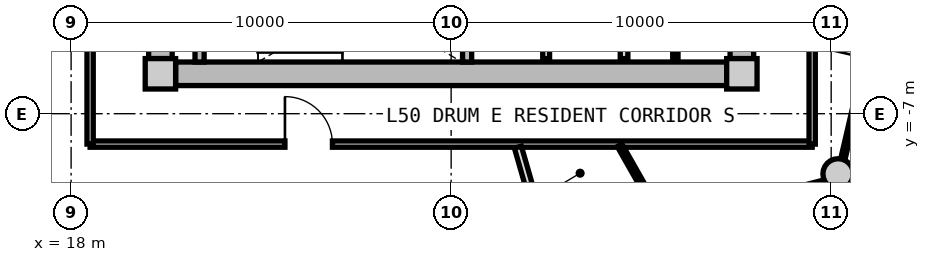
"""IFC4 building model, lengths in metres.
Left out: names, types, materials, properties, quantities, classifications, styles, units other than length and angle.
Written with IfcOpenShell. Run it as: python <this file> out.ifc"""

import sys

from ifc_helpers import new_model, si_unit, direction, frame, frame_2d, origin, origin_2d, place, context, subcontext, project, spatial, rectangle, circle, extrude, source, transform, mapped, element, fill, save


model = new_model("IFC4")
c1 = context("Model", 3, precision=1e-05, world=origin(), true_north=direction((0.0, 1.0)))
c2 = subcontext(c1, "Body", "Model", "MODEL_VIEW")
j1 = project(units=[si_unit("LENGTHUNIT", "METRE"), si_unit("PLANEANGLEUNIT", "RADIAN")], contexts=[c1])
p1 = place(None, origin())
s1 = spatial("IfcSite", under=j1, at=p1, CompositionType="ELEMENT")
p2 = place(p1, origin())
s2 = spatial("IfcBuilding", under=s1, at=p2, CompositionType="ELEMENT")
p3 = place(p2, frame((0.0, 0.0, 161.75)))
s3 = spatial("IfcBuildingStorey", under=s2, at=p3, CompositionType="ELEMENT", Elevation=161.75)
m1 = source(origin(), c2, "Body", "SweptSolid", [
    extrude(rectangle(XDim=0.8, YDim=0.8, at=origin_2d()), origin(), (0.0, 0.0, 1.0), 3.05),
])
for number, where, z_axis, x_axis in (
    (1, (20.35, -5.95, 0.0), (0.0, 0.0, 1.0), (1.0, 0.0, 0.0)),
    (2, (35.65, -5.95, 0.0), (0.0, 0.0, 1.0), (1.0, 0.0, 0.0)),
):
    element("IfcColumn", number, at=place(p3, frame(where, z_axis=z_axis, x_axis=x_axis)), inside=s3, PredefinedType="COLUMN", context=c2, shape_type="MappedRepresentation", body=[
        mapped(m1, transform((0.0, 0.0, 0.0), x_axis=(1.0, 0.0, 0.0), y_axis=(0.0, 1.0, 0.0), z_axis=(0.0, 0.0, 1.0), scale=1.0)),
    ])
m2 = source(origin(), c2, "Body", "SweptSolid", [
    extrude(rectangle(XDim=14.5, YDim=0.62, at=frame_2d((7.25, 0.0))), origin(), (0.0, 0.0, 1.0), 2.81),
])
p4 = place(p3, frame((35.25, -5.95, 0.0), z_axis=(0.0, 0.0, 1.0), x_axis=(-1.0, 0.0, 0.0)))
e3 = element("IfcWall", 3, at=p4, inside=s3, PredefinedType="SHEAR", context=c2, shape_type="MappedRepresentation", body=[
    mapped(m2, transform((0.0, 0.0, 0.0), x_axis=(1.0, 0.0, 0.0), y_axis=(0.0, 1.0, 0.0), z_axis=(0.0, 0.0, 1.0), scale=1.0)),
])
m3 = source(origin(), c2, "Body", "SweptSolid", [
    extrude(rectangle(XDim=11.1, YDim=0.62, at=frame_2d((5.55, 0.0))), origin(), (0.0, 0.0, 1.0), 2.81),
])
p5 = place(p3, frame((20.35, -5.55, 0.0), z_axis=(0.0, 0.0, 1.0), x_axis=(0.0, 1.0, 0.0)))
e4 = element("IfcWall", 4, at=p5, inside=s3, PredefinedType="SHEAR", context=c2, shape_type="MappedRepresentation", body=[
    mapped(m3, transform((0.0, 0.0, 0.0), x_axis=(1.0, 0.0, 0.0), y_axis=(0.0, 1.0, 0.0), z_axis=(0.0, 0.0, 1.0), scale=1.0)),
])
p6 = place(p5, frame((3.8, 0.0, 0.0)))
e5 = element("IfcOpeningElement", 5, at=p6, cuts=e4, PredefinedType="OPENING", context=c2, shape_type="SweptSolid", body=[
    extrude(rectangle(XDim=1.2, YDim=2.15, at=frame_2d((0.6, 1.075))), frame((0.0, 0.32, 0.0), z_axis=(0.0, -1.0, 0.0), x_axis=(1.0, 0.0, 0.0)), (0.0, 0.0, 1.0), 0.64),
])
p7 = place(p3, frame((35.65, 5.55, 0.0), z_axis=(0.0, 0.0, 1.0), x_axis=(0.0, -1.0, 0.0)))
e6 = element("IfcWall", 6, at=p7, inside=s3, PredefinedType="SHEAR", context=c2, shape_type="MappedRepresentation", body=[
    mapped(m3, transform((0.0, 0.0, 0.0), x_axis=(1.0, 0.0, 0.0), y_axis=(0.0, 1.0, 0.0), z_axis=(0.0, 0.0, 1.0), scale=1.0)),
])
p8 = place(p7, frame((5.65, 0.0, 0.0)))
e7 = element("IfcOpeningElement", 7, at=p8, cuts=e6, PredefinedType="OPENING", context=c2, shape_type="SweptSolid", body=[
    extrude(rectangle(XDim=1.2, YDim=2.15, at=frame_2d((0.6, 1.075))), frame((0.0, 0.32, 0.0), z_axis=(0.0, -1.0, 0.0), x_axis=(1.0, 0.0, 0.0)), (0.0, 0.0, 1.0), 0.64),
])
m4 = source(origin(), c2, "Body", "SweptSolid", [
    extrude(circle(Radius=0.4, at=origin_2d()), origin(), (0.0, 0.0, 1.0), 3.05),
])
p9 = place(p3, frame((38.183, -8.584, 0.0), z_axis=(0.0, 0.0, 1.0), x_axis=(1.0, 0.0, 0.0)))
e8 = element("IfcColumn", 8, at=p9, inside=s3, PredefinedType="COLUMN", context=c2, shape_type="MappedRepresentation", body=[
    mapped(m4, transform((0.0, 0.0, 0.0), x_axis=(1.0, 0.0, 0.0), y_axis=(0.0, 1.0, 0.0), z_axis=(0.0, 0.0, 1.0), scale=1.0)),
])
m5 = source(origin(), c2, "Body", "SweptSolid", [
    extrude(rectangle(XDim=3.19, YDim=0.24, at=frame_2d((1.595, 0.0))), origin(), (0.0, 0.0, 1.0), 2.81),
])
for number, where, z_axis, x_axis in (
    (9, (21.38, -5.64, 0.0), (0.0, 0.0, 1.0), (0.0, 1.0, 0.0)),
    (10, (28.42, -5.64, 0.0), (0.0, 0.0, 1.0), (0.0, 1.0, 0.0)),
):
    element("IfcWall", number, at=place(p3, frame(where, z_axis=z_axis, x_axis=x_axis)), inside=s3, PredefinedType="PARTITIONING", context=c2, shape_type="MappedRepresentation", body=[
        mapped(m5, transform((0.0, 0.0, 0.0), x_axis=(1.0, 0.0, 0.0), y_axis=(0.0, 1.0, 0.0), z_axis=(0.0, 0.0, 1.0), scale=1.0)),
    ])
m6 = source(origin(), c2, "Body", "SweptSolid", [
    extrude(rectangle(XDim=3.8, YDim=0.2, at=frame_2d((1.9, 0.0))), origin(), (0.0, 0.0, 1.0), 2.795),
])
p10 = place(p3, frame((32.55, -5.55, 0.0), z_axis=(0.0, 0.0, 1.0), x_axis=(0.0, 1.0, 0.0)))
e11 = element("IfcWall", 11, at=p10, inside=s3, PredefinedType="PARTITIONING", context=c2, shape_type="MappedRepresentation", body=[
    mapped(m6, transform((0.0, 0.0, 0.0), x_axis=(1.0, 0.0, 0.0), y_axis=(0.0, 1.0, 0.0), z_axis=(0.0, 0.0, 1.0), scale=1.0)),
])
m7 = source(origin(), c2, "Body", "SweptSolid", [
    extrude(rectangle(XDim=4.2, YDim=0.18, at=frame_2d((2.1, 0.0))), origin(), (0.0, 0.0, 1.0), 2.795),
])
p11 = place(p3, frame((30.5, -5.55, 0.0), z_axis=(0.0, 0.0, 1.0), x_axis=(0.0, 1.0, 0.0)))
e12 = element("IfcWall", 12, at=p11, inside=s3, PredefinedType="PARTITIONING", context=c2, shape_type="MappedRepresentation", body=[
    mapped(m7, transform((0.0, 0.0, 0.0), x_axis=(1.0, 0.0, 0.0), y_axis=(0.0, 1.0, 0.0), z_axis=(0.0, 0.0, 1.0), scale=1.0)),
])
m8 = source(origin(), c2, "Body", "SweptSolid", [
    extrude(rectangle(XDim=3.8, YDim=0.14, at=frame_2d((1.9, 0.0))), origin(), (0.0, 0.0, 1.0), 2.795),
])
p12 = place(p3, frame((33.9, -5.55, 0.0), z_axis=(0.0, 0.0, 1.0), x_axis=(0.0, 1.0, 0.0)))
e13 = element("IfcWall", 13, at=p12, inside=s3, PredefinedType="PARTITIONING", context=c2, shape_type="MappedRepresentation", body=[
    mapped(m8, transform((0.0, 0.0, 0.0), x_axis=(1.0, 0.0, 0.0), y_axis=(0.0, 1.0, 0.0), z_axis=(0.0, 0.0, 1.0), scale=1.0)),
])
m9 = source(origin(), c2, "Body", "SweptSolid", [
    extrude(rectangle(XDim=19.0, YDim=0.165, at=frame_2d((9.5, 0.0))), origin(), (0.0, 0.0, 1.0), 2.795),
])
p13 = place(p3, frame((37.5, -7.8, 0.0), z_axis=(0.0, 0.0, 1.0), x_axis=(-1.0, 0.0, 0.0)))
e14 = element("IfcWall", 14, at=p13, inside=s3, PredefinedType="PARTITIONING", context=c2, shape_type="MappedRepresentation", body=[
    mapped(m9, transform((0.0, 0.0, 0.0), x_axis=(1.0, 0.0, 0.0), y_axis=(0.0, 1.0, 0.0), z_axis=(0.0, 0.0, 1.0), scale=1.0)),
])
p14 = place(p13, frame((12.623, 0.0, 0.0)))
e15 = element("IfcOpeningElement", 15, at=p14, cuts=e14, PredefinedType="OPENING", context=c2, shape_type="SweptSolid", body=[
    extrude(rectangle(XDim=1.25, YDim=2.2, at=frame_2d((0.625, 1.1))), frame((0.0, 0.093, 0.0), z_axis=(0.0, -1.0, 0.0), x_axis=(1.0, 0.0, 0.0)), (0.0, 0.0, 1.0), 0.185),
])
m10 = source(origin(), c2, "Body", "SweptSolid", [
    extrude(rectangle(XDim=7.365, YDim=0.165, at=frame_2d((3.682, 0.0))), origin(), (0.0, 0.0, 1.0), 2.795),
])
p15 = place(p3, frame((18.5, -7.8, 0.0), z_axis=(0.0, 0.0, 1.0), x_axis=(0.0, 1.0, 0.0)))
e16 = element("IfcWall", 16, at=p15, inside=s3, PredefinedType="PARTITIONING", context=c2, shape_type="MappedRepresentation", body=[
    mapped(m10, transform((0.0, 0.0, 0.0), x_axis=(1.0, 0.0, 0.0), y_axis=(0.0, 1.0, 0.0), z_axis=(0.0, 0.0, 1.0), scale=1.0)),
])
m11 = source(origin(), c2, "Body", "SweptSolid", [
    extrude(rectangle(XDim=6.88, YDim=0.165, at=frame_2d((3.44, 0.0))), origin(), (0.0, 0.0, 1.0), 2.795),
])
p16 = place(p3, frame((37.5, -0.92, 0.0), z_axis=(0.0, 0.0, 1.0), x_axis=(0.0, -1.0, 0.0)))
e17 = element("IfcWall", 17, at=p16, inside=s3, PredefinedType="PARTITIONING", context=c2, shape_type="MappedRepresentation", body=[
    mapped(m11, transform((0.0, 0.0, 0.0), x_axis=(1.0, 0.0, 0.0), y_axis=(0.0, 1.0, 0.0), z_axis=(0.0, 0.0, 1.0), scale=1.0)),
])
p17 = place(p16, frame((2.915, 0.0, 0.0)))
e18 = element("IfcOpeningElement", 18, at=p17, cuts=e17, PredefinedType="OPENING", context=c2, shape_type="SweptSolid", body=[
    extrude(rectangle(XDim=1.05, YDim=2.15, at=frame_2d((0.525, 1.075))), frame((0.0, 0.093, 0.0), z_axis=(0.0, -1.0, 0.0), x_axis=(1.0, 0.0, 0.0)), (0.0, 0.0, 1.0), 0.185),
])
m12 = source(origin(), c2, "Body", "SweptSolid", [
    extrude(rectangle(XDim=6.035, YDim=0.19, at=frame_2d((3.018, 0.0))), origin(), (0.0, 0.0, 1.0), 2.345),
])
p18 = place(p3, frame((29.756, -7.88, 0.0), z_axis=(0.0, 0.0, 1.0), x_axis=(0.276809454862, -0.960924828329, 0.0)))
e19 = element("IfcWall", 19, at=p18, inside=s3, PredefinedType="PARTITIONING", context=c2, shape_type="MappedRepresentation", body=[
    mapped(m12, transform((0.0, 0.0, 0.0), x_axis=(1.0, 0.0, 0.0), y_axis=(0.0, 1.0, 0.0), z_axis=(0.0, 0.0, 1.0), scale=1.0)),
])
m13 = source(origin(), c2, "Body", "SweptSolid", [
    extrude(rectangle(XDim=7.469, YDim=0.115, at=frame_2d((3.734, 0.0))), origin(), (0.0, 0.0, 1.0), 2.795),
])
p19 = place(p3, frame((38.187, -8.715, 0.0), z_axis=(0.0, 0.0, 1.0), x_axis=(0.226790420763, 0.973943584121, 0.0)))
e20 = element("IfcWall", 20, at=p19, inside=s3, PredefinedType="PARTITIONING", context=c2, shape_type="MappedRepresentation", body=[
    mapped(m13, transform((0.0, 0.0, 0.0), x_axis=(1.0, 0.0, 0.0), y_axis=(0.0, 1.0, 0.0), z_axis=(0.0, 0.0, 1.0), scale=1.0)),
])
p20 = place(p19, frame((3.259, 0.0, 0.0)))
e21 = element("IfcOpeningElement", 21, at=p20, cuts=e20, PredefinedType="OPENING", context=c2, shape_type="SweptSolid", body=[
    extrude(rectangle(XDim=0.95, YDim=2.1, at=frame_2d((0.475, 1.05))), frame((0.0, 0.067, 0.0), z_axis=(0.0, -1.0, 0.0), x_axis=(1.0, 0.0, 0.0)), (0.0, 0.0, 1.0), 0.135),
])
m14 = source(origin(), c2, "Body", "SweptSolid", [
    extrude(rectangle(XDim=1.258, YDim=0.115, at=frame_2d((0.629, 0.0))), origin(), (0.0, 0.0, 1.0), 2.795),
])
p21 = place(p3, frame((38.187, -8.715, 0.0), z_axis=(0.0, 0.0, 1.0), x_axis=(0.755765923317, -0.654841865761, 0.0)))
e22 = element("IfcWall", 22, at=p21, inside=s3, PredefinedType="PARTITIONING", context=c2, shape_type="MappedRepresentation", body=[
    mapped(m14, transform((0.0, 0.0, 0.0), x_axis=(1.0, 0.0, 0.0), y_axis=(0.0, 1.0, 0.0), z_axis=(0.0, 0.0, 1.0), scale=1.0)),
])
m15 = source(origin(), c2, "Body", "SweptSolid", [
    extrude(rectangle(XDim=1.635, YDim=0.14, at=frame_2d((0.817, 0.0))), origin(), (0.0, 0.0, 1.0), 2.795),
])
p22 = place(p3, frame((32.434, -7.83, 0.0), z_axis=(0.0, 0.0, 1.0), x_axis=(0.494078690764, -0.869417188312, 0.0)))
e23 = element("IfcWall", 23, at=p22, inside=s3, PredefinedType="PARTITIONING", context=c2, shape_type="MappedRepresentation", body=[
    mapped(m15, transform((0.0, 0.0, 0.0), x_axis=(1.0, 0.0, 0.0), y_axis=(0.0, 1.0, 0.0), z_axis=(0.0, 0.0, 1.0), scale=1.0)),
])
m16 = source(origin(), c2, "Body", "SweptSolid", [
    extrude(rectangle(XDim=4.218, YDim=0.115, at=frame_2d((2.109, 0.0))), origin(), (0.0, 0.0, 1.0), 2.345),
])
p23 = place(p3, frame((34.095, -9.764, 0.0), z_axis=(0.0, 0.0, 1.0), x_axis=(0.968124892577, 0.250467946797, 0.0)))
e24 = element("IfcWall", 24, at=p23, inside=s3, PredefinedType="PARTITIONING", context=c2, shape_type="MappedRepresentation", body=[
    mapped(m16, transform((0.0, 0.0, 0.0), x_axis=(1.0, 0.0, 0.0), y_axis=(0.0, 1.0, 0.0), z_axis=(0.0, 0.0, 1.0), scale=1.0)),
])
p24 = place(p23, frame((1.634, 0.0, 0.0)))
e25 = element("IfcOpeningElement", 25, at=p24, cuts=e24, PredefinedType="OPENING", context=c2, shape_type="SweptSolid", body=[
    extrude(rectangle(XDim=0.95, YDim=2.1, at=frame_2d((0.475, 1.05))), frame((0.0, 0.067, 0.0), z_axis=(0.0, -1.0, 0.0), x_axis=(1.0, 0.0, 0.0)), (0.0, 0.0, 1.0), 0.135),
])
m17 = source(origin(), c2, "Body", "SweptSolid", [
    extrude(rectangle(XDim=1.25, YDim=2.2, at=frame_2d((0.625, 1.1))), frame((0.0, 0.025, 0.0), z_axis=(0.0, -1.0, 0.0), x_axis=(1.0, 0.0, 0.0)), (0.0, 0.0, 1.0), 0.05),
])
p25 = place(p14, frame((1.25, 0.0, 0.0), z_axis=(0.0, 0.0, 1.0), x_axis=(-1.0, 0.0, 0.0)))
e26 = element("IfcDoor", 26, at=p25, inside=s3, OperationType="SINGLE_SWING_LEFT", PredefinedType="DOOR", context=c2, shape_type="MappedRepresentation", body=[
    mapped(m17, transform((0.0, 0.0, 0.0), x_axis=(1.0, 0.0, 0.0), y_axis=(0.0, 1.0, 0.0), z_axis=(0.0, 0.0, 1.0), scale=1.0)),
])
fill(e15, e26)
save(model, sys.argv[1])
